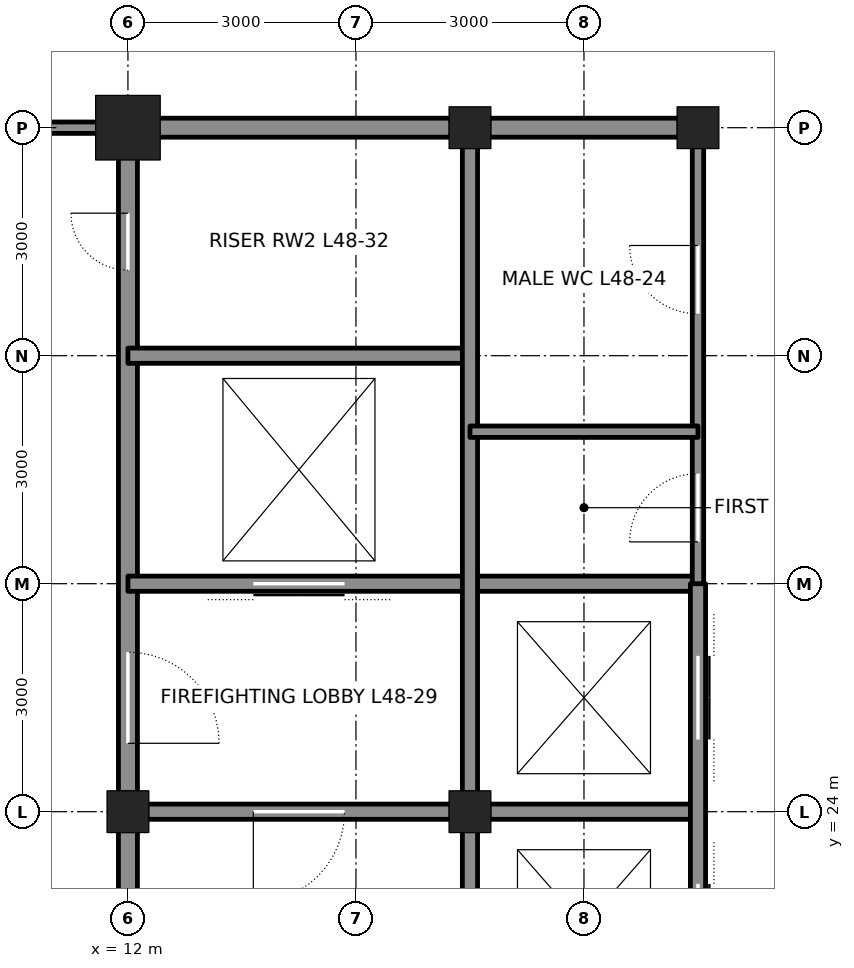
"""IFC4 building model, lengths in metres.
Left out: names, types, materials, properties, quantities, classifications, styles, units other than length and angle.
Written with IfcOpenShell. Run it as: python <this file> out.ifc"""

import sys

from ifc_helpers import new_model, si_unit, direction, frame, frame_2d, origin, origin_2d, place, context, subcontext, project, spatial, rectangle, hollow_rectangle, extrude, element, fill, save


model = new_model("IFC4")
c1 = context("Model", 3, precision=1e-05, world=origin(), true_north=direction((0.0, 1.0)))
c2 = subcontext(c1, "Body", "Model", "MODEL_VIEW")
j1 = project(units=[si_unit("LENGTHUNIT", "METRE"), si_unit("PLANEANGLEUNIT", "RADIAN")], contexts=[c1])
p1 = place(None, origin())
s1 = spatial("IfcSite", under=j1, at=p1, CompositionType="ELEMENT")
p2 = place(p1, origin())
s2 = spatial("IfcBuilding", under=s1, at=p2, CompositionType="ELEMENT")
p3 = place(p2, frame((0.0, 0.0, 218.1)))
s3 = spatial("IfcBuildingStorey", under=s2, at=p3, CompositionType="ELEMENT", Elevation=218.1)
p4 = place(p3, frame((12.0, 33.0, 0.0), z_axis=(0.0, 0.0, 1.0), x_axis=(1.0, 0.0, 0.0)))
e1 = element("IfcColumn", 1, at=p4, inside=s3, PredefinedType="COLUMN", context=c2, shape_type="SweptSolid", body=[
    extrude(hollow_rectangle(XDim=0.85, YDim=0.85, WallThickness=0.085, at=origin_2d()), origin(), (0.0, 0.0, 1.0), 4.2),
])
for number, where, z_axis, x_axis in (
    (2, (16.5, 33.0, 0.0), (0.0, 0.0, 1.0), (1.0, 0.0, 0.0)),
    (3, (19.5, 33.0, 0.0), (0.0, 0.0, 1.0), (1.0, 0.0, 0.0)),
    (4, (12.0, 24.0, 0.0), (0.0, 0.0, 1.0), (1.0, 0.0, 0.0)),
    (5, (16.5, 24.0, 0.0), (0.0, 0.0, 1.0), (1.0, 0.0, 0.0)),
):
    element("IfcColumn", number, at=place(p3, frame(where, z_axis=z_axis, x_axis=x_axis)), inside=s3, PredefinedType="COLUMN", context=c2, shape_type="SweptSolid", body=[
        extrude(hollow_rectangle(XDim=0.55, YDim=0.55, WallThickness=0.045, at=origin_2d()), origin(), (0.0, 0.0, 1.0), 4.2),
    ])
p5 = place(p3, frame((12.0, 21.25, 0.0), z_axis=(0.0, 0.0, 1.0), x_axis=(0.0, 1.0, 0.0)))
e6 = element("IfcWall", 6, at=p5, inside=s3, PredefinedType="SOLIDWALL", context=c2, shape_type="SweptSolid", body=[
    extrude(rectangle(XDim=2.5, YDim=0.25, at=frame_2d((1.25, 0.0))), origin(), (0.0, 0.0, 1.0), 3.113),
])
p6 = place(p3, frame((12.0, 24.25, 0.0), z_axis=(0.0, 0.0, 1.0), x_axis=(0.0, 1.0, 0.0)))
e7 = element("IfcWall", 7, at=p6, inside=s3, PredefinedType="SOLIDWALL", context=c2, shape_type="SweptSolid", body=[
    extrude(rectangle(XDim=8.5, YDim=0.25, at=frame_2d((4.25, 0.0))), origin(), (0.0, 0.0, 1.0), 3.113),
])
p7 = place(p6, frame((0.65, 0.0, 0.0)))
e8 = element("IfcOpeningElement", 8, at=p7, cuts=e7, PredefinedType="OPENING", context=c2, shape_type="SweptSolid", body=[
    extrude(rectangle(XDim=1.2, YDim=2.1, at=frame_2d((0.6, 1.05))), frame((0.0, 0.135, 0.0), z_axis=(0.0, -1.0, 0.0), x_axis=(1.0, 0.0, 0.0)), (0.0, 0.0, 1.0), 0.27),
])
p8 = place(p6, frame((6.875, 0.0, 0.0)))
e9 = element("IfcOpeningElement", 9, at=p8, cuts=e7, PredefinedType="OPENING", context=c2, shape_type="SweptSolid", body=[
    extrude(rectangle(XDim=0.75, YDim=2.1, at=frame_2d((0.375, 1.05))), frame((0.0, 0.135, 0.0), z_axis=(0.0, -1.0, 0.0), x_axis=(1.0, 0.0, 0.0)), (0.0, 0.0, 1.0), 0.27),
])
p9 = place(p3, frame((12.25, 24.0, 0.0), z_axis=(0.0, 0.0, 1.0), x_axis=(1.0, 0.0, 0.0)))
e10 = element("IfcWall", 10, at=p9, inside=s3, PredefinedType="SOLIDWALL", context=c2, shape_type="SweptSolid", body=[
    extrude(rectangle(XDim=4.0, YDim=0.2, at=frame_2d((2.0, 0.0))), origin(), (0.0, 0.0, 1.0), 3.09),
])
p10 = place(p9, frame((1.4, 0.0, 0.0)))
e11 = element("IfcOpeningElement", 11, at=p10, cuts=e10, PredefinedType="OPENING", context=c2, shape_type="SweptSolid", body=[
    extrude(rectangle(XDim=1.2, YDim=2.1, at=frame_2d((0.6, 1.05))), frame((0.0, 0.11, 0.0), z_axis=(0.0, -1.0, 0.0), x_axis=(1.0, 0.0, 0.0)), (0.0, 0.0, 1.0), 0.22),
])
p11 = place(p3, frame((16.75, 24.0, 0.0), z_axis=(0.0, 0.0, 1.0), x_axis=(1.0, 0.0, 0.0)))
e12 = element("IfcWall", 12, at=p11, inside=s3, PredefinedType="SOLIDWALL", context=c2, shape_type="SweptSolid", body=[
    extrude(rectangle(XDim=2.75, YDim=0.2, at=frame_2d((1.375, 0.0))), origin(), (0.0, 0.0, 1.0), 3.09),
])
p12 = place(p3, frame((12.0, 27.0, 0.0), z_axis=(0.0, 0.0, 1.0), x_axis=(1.0, 0.0, 0.0)))
e13 = element("IfcWall", 13, at=p12, inside=s3, PredefinedType="SOLIDWALL", context=c2, shape_type="SweptSolid", body=[
    extrude(rectangle(XDim=7.5, YDim=0.2, at=frame_2d((3.75, 0.0))), origin(), (0.0, 0.0, 1.0), 4.04),
])
p13 = place(p12, frame((1.65, 0.0, 0.0)))
e14 = element("IfcOpeningElement", 14, at=p13, cuts=e13, PredefinedType="OPENING", context=c2, shape_type="SweptSolid", body=[
    extrude(rectangle(XDim=1.2, YDim=2.1, at=frame_2d((0.6, 1.05))), frame((0.0, 0.11, 0.0), z_axis=(0.0, -1.0, 0.0), x_axis=(1.0, 0.0, 0.0)), (0.0, 0.0, 1.0), 0.22),
])
p14 = place(p3, frame((12.0, 30.0, 0.0), z_axis=(0.0, 0.0, 1.0), x_axis=(1.0, 0.0, 0.0)))
e15 = element("IfcWall", 15, at=p14, inside=s3, PredefinedType="SOLIDWALL", context=c2, shape_type="SweptSolid", body=[
    extrude(rectangle(XDim=4.5, YDim=0.2, at=frame_2d((2.25, 0.0))), origin(), (0.0, 0.0, 1.0), 4.04),
])
p15 = place(p3, frame((12.25, 33.0, 0.0), z_axis=(0.0, 0.0, 1.0), x_axis=(1.0, 0.0, 0.0)))
e16 = element("IfcWall", 16, at=p15, inside=s3, PredefinedType="SOLIDWALL", context=c2, shape_type="SweptSolid", body=[
    extrude(rectangle(XDim=4.0, YDim=0.25, at=frame_2d((2.0, 0.0))), origin(), (0.0, 0.0, 1.0), 3.181),
])
p16 = place(p3, frame((16.75, 33.0, 0.0), z_axis=(0.0, 0.0, 1.0), x_axis=(1.0, 0.0, 0.0)))
e17 = element("IfcWall", 17, at=p16, inside=s3, PredefinedType="SOLIDWALL", context=c2, shape_type="SweptSolid", body=[
    extrude(rectangle(XDim=2.5, YDim=0.25, at=frame_2d((1.25, 0.0))), origin(), (0.0, 0.0, 1.0), 3.181),
])
p17 = place(p3, frame((16.5, 21.25, 0.0), z_axis=(0.0, 0.0, 1.0), x_axis=(0.0, 1.0, 0.0)))
e18 = element("IfcWall", 18, at=p17, inside=s3, PredefinedType="SOLIDWALL", context=c2, shape_type="SweptSolid", body=[
    extrude(rectangle(XDim=2.5, YDim=0.2, at=frame_2d((1.25, 0.0))), origin(), (0.0, 0.0, 1.0), 3.113),
])
p18 = place(p3, frame((16.5, 24.25, 0.0), z_axis=(0.0, 0.0, 1.0), x_axis=(0.0, 1.0, 0.0)))
e19 = element("IfcWall", 19, at=p18, inside=s3, PredefinedType="SOLIDWALL", context=c2, shape_type="SweptSolid", body=[
    extrude(rectangle(XDim=8.5, YDim=0.2, at=frame_2d((4.25, 0.0))), origin(), (0.0, 0.0, 1.0), 3.113),
])
p19 = place(p3, frame((19.5, 15.0, 0.0), z_axis=(0.0, 0.0, 1.0), x_axis=(0.0, 1.0, 0.0)))
e20 = element("IfcWall", 20, at=p19, inside=s3, PredefinedType="SOLIDWALL", context=c2, shape_type="SweptSolid", body=[
    extrude(rectangle(XDim=12.0, YDim=0.2, at=frame_2d((6.0, 0.0))), origin(), (0.0, 0.0, 1.0), 3.064),
])
p20 = place(p19, frame((0.95, 0.0, 0.0)))
e21 = element("IfcOpeningElement", 21, at=p20, cuts=e20, PredefinedType="OPENING", context=c2, shape_type="SweptSolid", body=[
    extrude(rectangle(XDim=1.1, YDim=2.1, at=frame_2d((0.55, 1.05))), frame((0.0, 0.11, 0.0), z_axis=(0.0, -1.0, 0.0), x_axis=(1.0, 0.0, 0.0)), (0.0, 0.0, 1.0), 0.22),
])
p21 = place(p19, frame((3.95, 0.0, 0.0)))
e22 = element("IfcOpeningElement", 22, at=p21, cuts=e20, PredefinedType="OPENING", context=c2, shape_type="SweptSolid", body=[
    extrude(rectangle(XDim=1.1, YDim=2.1, at=frame_2d((0.55, 1.05))), frame((0.0, 0.11, 0.0), z_axis=(0.0, -1.0, 0.0), x_axis=(1.0, 0.0, 0.0)), (0.0, 0.0, 1.0), 0.22),
])
p22 = place(p19, frame((6.95, 0.0, 0.0)))
e23 = element("IfcOpeningElement", 23, at=p22, cuts=e20, PredefinedType="OPENING", context=c2, shape_type="SweptSolid", body=[
    extrude(rectangle(XDim=1.1, YDim=2.1, at=frame_2d((0.55, 1.05))), frame((0.0, 0.11, 0.0), z_axis=(0.0, -1.0, 0.0), x_axis=(1.0, 0.0, 0.0)), (0.0, 0.0, 1.0), 0.22),
])
p23 = place(p19, frame((9.95, 0.0, 0.0)))
e24 = element("IfcOpeningElement", 24, at=p23, cuts=e20, PredefinedType="OPENING", context=c2, shape_type="SweptSolid", body=[
    extrude(rectangle(XDim=1.1, YDim=2.1, at=frame_2d((0.55, 1.05))), frame((0.0, 0.11, 0.0), z_axis=(0.0, -1.0, 0.0), x_axis=(1.0, 0.0, 0.0)), (0.0, 0.0, 1.0), 0.22),
])
p24 = place(p3, frame((19.5, 27.0, 0.0), z_axis=(0.0, 0.0, 1.0), x_axis=(0.0, 1.0, 0.0)))
e25 = element("IfcWall", 25, at=p24, inside=s3, PredefinedType="PARTITIONING", context=c2, shape_type="SweptSolid", body=[
    extrude(rectangle(XDim=5.75, YDim=0.15, at=frame_2d((2.875, 0.0))), origin(), (0.0, 0.0, 1.0), 3.064),
])
p25 = place(p24, frame((0.55, 0.0, 0.0)))
e26 = element("IfcOpeningElement", 26, at=p25, cuts=e25, PredefinedType="OPENING", context=c2, shape_type="SweptSolid", body=[
    extrude(rectangle(XDim=0.9, YDim=2.1, at=frame_2d((0.45, 1.05))), frame((0.0, 0.085, 0.0), z_axis=(0.0, -1.0, 0.0), x_axis=(1.0, 0.0, 0.0)), (0.0, 0.0, 1.0), 0.17),
])
p26 = place(p24, frame((3.55, 0.0, 0.0)))
e27 = element("IfcOpeningElement", 27, at=p26, cuts=e25, PredefinedType="OPENING", context=c2, shape_type="SweptSolid", body=[
    extrude(rectangle(XDim=0.9, YDim=2.1, at=frame_2d((0.45, 1.05))), frame((0.0, 0.085, 0.0), z_axis=(0.0, -1.0, 0.0), x_axis=(1.0, 0.0, 0.0)), (0.0, 0.0, 1.0), 0.17),
])
p27 = place(p3, frame((16.5, 29.0, 0.0), z_axis=(0.0, 0.0, 1.0), x_axis=(1.0, 0.0, 0.0)))
e28 = element("IfcWall", 28, at=p27, inside=s3, PredefinedType="PARTITIONING", context=c2, shape_type="SweptSolid", body=[
    extrude(rectangle(XDim=3.0, YDim=0.15, at=frame_2d((1.5, 0.0))), origin(), (0.0, 0.0, 1.0), 4.04),
])
p28 = place(p3, frame((10.2, 33.0, 0.0), z_axis=(0.0, 0.0, 1.0), x_axis=(1.0, 0.0, 0.0)))
e29 = element("IfcWall", 29, at=p28, inside=s3, PredefinedType="PARTITIONING", context=c2, shape_type="SweptSolid", body=[
    extrude(rectangle(XDim=1.8, YDim=0.15, at=frame_2d((0.9, 0.0))), origin(), (0.0, 0.0, 1.0), 3.27),
])
p29 = place(p10, frame((1.2, 0.0, 0.0), z_axis=(0.0, 0.0, 1.0), x_axis=(-1.0, 0.0, 0.0)))
e30 = element("IfcDoor", 30, at=p29, inside=s3, OperationType="SINGLE_SWING_RIGHT", PredefinedType="DOOR", context=c2, shape_type="SweptSolid", body=[
    extrude(rectangle(XDim=1.2, YDim=2.1, at=frame_2d((0.6, 1.05))), frame((0.0, 0.025, 0.0), z_axis=(0.0, -1.0, 0.0), x_axis=(1.0, 0.0, 0.0)), (0.0, 0.0, 1.0), 0.05),
])
fill(e11, e30)
p30 = place(p7, frame((1.2, 0.0, 0.0), z_axis=(0.0, 0.0, 1.0), x_axis=(-1.0, 0.0, 0.0)))
e31 = element("IfcDoor", 31, at=p30, inside=s3, OperationType="SINGLE_SWING_RIGHT", PredefinedType="DOOR", context=c2, shape_type="SweptSolid", body=[
    extrude(rectangle(XDim=1.2, YDim=2.1, at=frame_2d((0.6, 1.05))), frame((0.0, 0.025, 0.0), z_axis=(0.0, -1.0, 0.0), x_axis=(1.0, 0.0, 0.0)), (0.0, 0.0, 1.0), 0.05),
])
fill(e8, e31)
p31 = place(p13, origin())
e32 = element("IfcDoor", 32, at=p31, inside=s3, OperationType="DOUBLE_DOOR_SLIDING", PredefinedType="DOOR", context=c2, shape_type="SweptSolid", body=[
    extrude(rectangle(XDim=1.2, YDim=2.1, at=frame_2d((0.6, 1.05))), frame((0.0, 0.025, 0.0), z_axis=(0.0, -1.0, 0.0), x_axis=(1.0, 0.0, 0.0)), (0.0, 0.0, 1.0), 0.05),
])
fill(e14, e32)
p32 = place(p8, origin())
e33 = element("IfcDoor", 33, at=p32, inside=s3, OperationType="SINGLE_SWING_RIGHT", PredefinedType="DOOR", context=c2, shape_type="SweptSolid", body=[
    extrude(rectangle(XDim=0.75, YDim=2.1, at=frame_2d((0.375, 1.05))), frame((0.0, 0.025, 0.0), z_axis=(0.0, -1.0, 0.0), x_axis=(1.0, 0.0, 0.0)), (0.0, 0.0, 1.0), 0.05),
])
fill(e9, e33)
p33 = place(p25, origin())
e34 = element("IfcDoor", 34, at=p33, inside=s3, OperationType="SINGLE_SWING_LEFT", PredefinedType="DOOR", context=c2, shape_type="SweptSolid", body=[
    extrude(rectangle(XDim=0.9, YDim=2.1, at=frame_2d((0.45, 1.05))), frame((0.0, 0.025, 0.0), z_axis=(0.0, -1.0, 0.0), x_axis=(1.0, 0.0, 0.0)), (0.0, 0.0, 1.0), 0.05),
])
fill(e26, e34)
p34 = place(p26, origin())
e35 = element("IfcDoor", 35, at=p34, inside=s3, OperationType="SINGLE_SWING_RIGHT", PredefinedType="DOOR", context=c2, shape_type="SweptSolid", body=[
    extrude(rectangle(XDim=0.9, YDim=2.1, at=frame_2d((0.45, 1.05))), frame((0.0, 0.025, 0.0), z_axis=(0.0, -1.0, 0.0), x_axis=(1.0, 0.0, 0.0)), (0.0, 0.0, 1.0), 0.05),
])
fill(e27, e35)
p35 = place(p22, origin())
e36 = element("IfcDoor", 36, at=p35, inside=s3, OperationType="DOUBLE_DOOR_SLIDING", PredefinedType="DOOR", context=c2, shape_type="SweptSolid", body=[
    extrude(rectangle(XDim=1.1, YDim=2.1, at=frame_2d((0.55, 1.05))), frame((0.0, 0.025, 0.0), z_axis=(0.0, -1.0, 0.0), x_axis=(1.0, 0.0, 0.0)), (0.0, 0.0, 1.0), 0.05),
])
fill(e23, e36)
p36 = place(p23, origin())
e37 = element("IfcDoor", 37, at=p36, inside=s3, OperationType="DOUBLE_DOOR_SLIDING", PredefinedType="DOOR", context=c2, shape_type="SweptSolid", body=[
    extrude(rectangle(XDim=1.1, YDim=2.1, at=frame_2d((0.55, 1.05))), frame((0.0, 0.025, 0.0), z_axis=(0.0, -1.0, 0.0), x_axis=(1.0, 0.0, 0.0)), (0.0, 0.0, 1.0), 0.05),
])
fill(e24, e37)
save(model, sys.argv[1])
